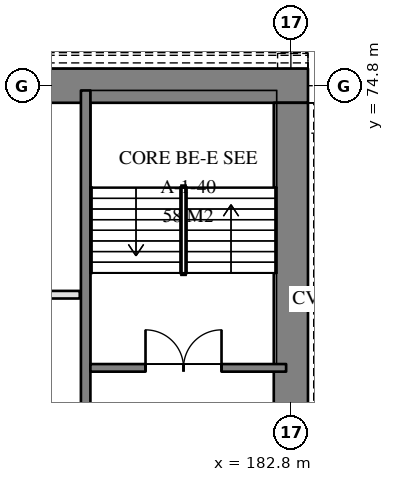
"""IFC4 building model, lengths in metres.
Left out: names, types, materials, properties, quantities, classifications, styles, units other than length and angle.
Written with IfcOpenShell. Run it as: python <this file> out.ifc"""

import sys

from ifc_helpers import new_model, si_unit, direction, frame, frame_2d, origin, place, context, subcontext, project, spatial, rectangle, extrude, element, fill, save


model = new_model("IFC4")
c1 = context("Model", 3, precision=1e-05, world=origin(), true_north=direction((0.0, 1.0)))
c2 = subcontext(c1, "Body", "Model", "MODEL_VIEW")
j1 = project(units=[si_unit("LENGTHUNIT", "METRE"), si_unit("PLANEANGLEUNIT", "RADIAN")], contexts=[c1])
p1 = place(None, origin())
s1 = spatial("IfcSite", under=j1, at=p1, CompositionType="ELEMENT")
p2 = place(p1, origin())
s2 = spatial("IfcBuilding", under=s1, at=p2, CompositionType="ELEMENT")
p3 = place(p2, frame((0.0, 0.0, -11.4)))
s3 = spatial("IfcBuildingStorey", under=s2, at=p3, CompositionType="ELEMENT", Elevation=-11.4)
p4 = place(p3, frame((183.25, 74.8, 0.0), z_axis=(0.0, 0.0, 1.0), x_axis=(-1.0, 0.0, 0.0)))
e1 = element("IfcWall", 1, at=p4, inside=s3, PredefinedType="SOLIDWALL", context=c2, shape_type="SweptSolid", body=[
    extrude(rectangle(XDim=162.9, YDim=0.9, at=frame_2d((81.45, 0.0))), origin(), (0.0, 0.0, 1.0), 6.0),
])
p5 = place(p3, frame((182.8, 53.65, 0.0), z_axis=(0.0, 0.0, 1.0), x_axis=(0.0, 1.0, 0.0)))
e2 = element("IfcWall", 2, at=p5, inside=s3, PredefinedType="SOLIDWALL", context=c2, shape_type="SweptSolid", body=[
    extrude(rectangle(XDim=20.7, YDim=0.9, at=frame_2d((10.35, 0.0))), origin(), (0.0, 0.0, 1.0), 6.0),
])
p6 = place(p3, frame((177.4, 74.675, 0.0), z_axis=(0.0, 0.0, 1.0), x_axis=(0.0, -1.0, 0.0)))
e3 = element("IfcWall", 3, at=p6, inside=s3, PredefinedType="SOLIDWALL", context=c2, shape_type="SweptSolid", body=[
    extrude(rectangle(XDim=10.55, YDim=0.25, at=frame_2d((5.275, 0.0))), origin(), (0.0, 0.0, 1.0), 6.0),
])
p7 = place(p3, frame((177.525, 67.375, 0.0), z_axis=(0.0, 0.0, 1.0), x_axis=(1.0, 0.0, 0.0)))
e4 = element("IfcWall", 4, at=p7, inside=s3, PredefinedType="SOLIDWALL", context=c2, shape_type="SweptSolid", body=[
    extrude(rectangle(XDim=5.15, YDim=0.2, at=frame_2d((2.575, 0.0))), origin(), (0.0, 0.0, 1.0), 5.6),
])
p8 = place(p7, frame((1.45, 0.0, 0.0)))
e5 = element("IfcOpeningElement", 5, at=p8, cuts=e4, PredefinedType="OPENING", context=c2, shape_type="SweptSolid", body=[
    extrude(rectangle(XDim=2.0, YDim=2.1, at=frame_2d((1.0, 1.05))), frame((0.0, 0.11, 0.0), z_axis=(0.0, -1.0, 0.0), x_axis=(1.0, 0.0, 0.0)), (0.0, 0.0, 1.0), 0.22),
])
p9 = place(p3, frame((161.2, 69.3, 0.0), z_axis=(0.0, 0.0, 1.0), x_axis=(1.0, 0.0, 0.0)))
e6 = element("IfcWall", 6, at=p9, inside=s3, PredefinedType="PARTITIONING", context=c2, shape_type="SweptSolid", body=[
    extrude(rectangle(XDim=16.045, YDim=0.2, at=frame_2d((8.022, 0.0))), origin(), (0.0, 0.0, 1.0), 4.7),
])
p10 = place(p8, frame((2.0, 0.0, 0.0), z_axis=(0.0, 0.0, 1.0), x_axis=(-1.0, 0.0, 0.0)))
e7 = element("IfcDoor", 7, at=p10, inside=s3, OperationType="DOUBLE_DOOR_DOUBLE_SWING", PredefinedType="DOOR", context=c2, shape_type="SweptSolid", body=[
    extrude(rectangle(XDim=2.0, YDim=2.1, at=frame_2d((1.0, 1.05))), frame((0.0, 0.025, 0.0), z_axis=(0.0, -1.0, 0.0), x_axis=(1.0, 0.0, 0.0)), (0.0, 0.0, 1.0), 0.05),
])
fill(e5, e7)
save(model, sys.argv[1])
